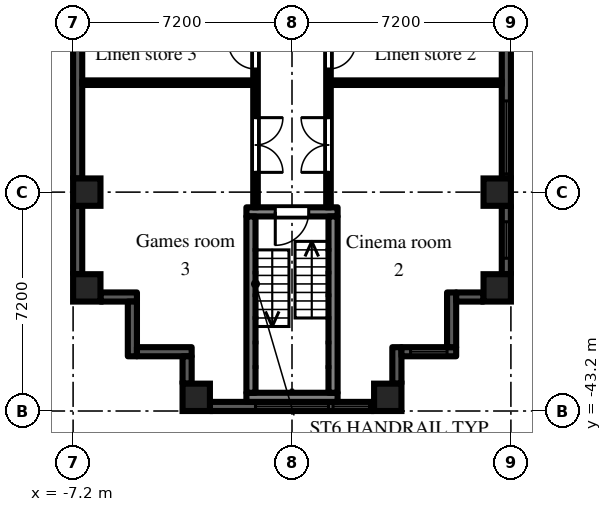
"""IFC4 building model, lengths in metres.
Left out: names, types, materials, properties, quantities, classifications, styles, units other than length and angle.
Written with IfcOpenShell. Run it as: python <this file> out.ifc"""

import sys

from ifc_helpers import new_model, si_unit, direction, frame, frame_2d, origin, origin_2d, place, context, subcontext, project, spatial, rectangle, extrude, element, fill, save


model = new_model("IFC4")
c1 = context("Model", 3, precision=1e-05, world=origin(), true_north=direction((0.0, 1.0)))
c2 = subcontext(c1, "Body", "Model", "MODEL_VIEW")
j1 = project(units=[si_unit("LENGTHUNIT", "METRE"), si_unit("PLANEANGLEUNIT", "RADIAN")], contexts=[c1])
p1 = place(None, origin())
s1 = spatial("IfcSite", under=j1, at=p1, CompositionType="ELEMENT")
p2 = place(p1, origin())
s2 = spatial("IfcBuilding", under=s1, at=p2, CompositionType="ELEMENT")
p3 = place(p2, frame((0.0, 0.0, 35.7)))
s3 = spatial("IfcBuildingStorey", under=s2, at=p3, CompositionType="ELEMENT", Elevation=35.7)
for number, where, z_axis, x_axis in (
    (1, (-6.75, -39.15, 0.0), (0.0, 0.0, 1.0), (1.0, 0.0, 0.0)),
    (2, (-6.75, -36.0, 0.0), (0.0, 0.0, 1.0), (1.0, 0.0, 0.0)),
    (3, (-3.15, -42.75, 0.0), (0.0, 0.0, 1.0), (1.0, 0.0, 0.0)),
    (4, (3.15, -42.75, 0.0), (0.0, 0.0, 1.0), (1.0, 0.0, 0.0)),
    (5, (6.75, -39.15, 0.0), (0.0, 0.0, 1.0), (1.0, 0.0, 0.0)),
    (6, (6.75, -36.0, 0.0), (0.0, 0.0, 1.0), (1.0, 0.0, 0.0)),
):
    element("IfcColumn", number, at=place(p3, frame(where, z_axis=z_axis, x_axis=x_axis)), inside=s3, PredefinedType="COLUMN", context=c2, shape_type="SweptSolid", body=[
        extrude(rectangle(XDim=0.9, YDim=0.9, at=origin_2d()), origin(), (0.0, 0.0, 1.0), 3.0),
    ])
p4 = place(p3, frame((-7.05, -29.25, 0.0), z_axis=(0.0, 0.0, 1.0), x_axis=(0.0, -1.0, 0.0)))
e7 = element("IfcWall", 7, at=p4, inside=s3, PredefinedType="SOLIDWALL", context=c2, shape_type="SweptSolid", body=[
    extrude(rectangle(XDim=6.3, YDim=0.3, at=frame_2d((3.15, 0.0))), origin(), (0.0, 0.0, 1.0), 2.1),
])
p5 = place(p3, frame((-7.05, -36.45, 0.0), z_axis=(0.0, 0.0, 1.0), x_axis=(0.0, -1.0, 0.0)))
e8 = element("IfcWall", 8, at=p5, inside=s3, PredefinedType="SOLIDWALL", context=c2, shape_type="SweptSolid", body=[
    extrude(rectangle(XDim=2.25, YDim=0.3, at=frame_2d((1.125, 0.0))), origin(), (0.0, 0.0, 1.0), 2.1),
])
p6 = place(p3, frame((-6.3, -39.45, 0.0), z_axis=(0.0, 0.0, 1.0), x_axis=(1.0, 0.0, 0.0)))
e9 = element("IfcWall", 9, at=p6, inside=s3, PredefinedType="SOLIDWALL", context=c2, shape_type="SweptSolid", body=[
    extrude(rectangle(XDim=1.2, YDim=0.3, at=frame_2d((0.6, 0.0))), origin(), (0.0, 0.0, 1.0), 2.575),
])
p7 = place(p3, frame((-5.25, -39.6, 0.0), z_axis=(0.0, 0.0, 1.0), x_axis=(0.0, -1.0, 0.0)))
e10 = element("IfcWall", 10, at=p7, inside=s3, PredefinedType="SOLIDWALL", context=c2, shape_type="SweptSolid", body=[
    extrude(rectangle(XDim=1.8, YDim=0.3, at=frame_2d((0.9, 0.0))), origin(), (0.0, 0.0, 1.0), 2.575),
])
p8 = place(p3, frame((-5.1, -41.25, 0.0), z_axis=(0.0, 0.0, 1.0), x_axis=(1.0, 0.0, 0.0)))
e11 = element("IfcWall", 11, at=p8, inside=s3, PredefinedType="SOLIDWALL", context=c2, shape_type="SweptSolid", body=[
    extrude(rectangle(XDim=1.8, YDim=0.3, at=frame_2d((0.9, 0.0))), origin(), (0.0, 0.0, 1.0), 2.575),
])
p9 = place(p3, frame((-3.45, -41.4, 0.0), z_axis=(0.0, 0.0, 1.0), x_axis=(0.0, -1.0, 0.0)))
e12 = element("IfcWall", 12, at=p9, inside=s3, PredefinedType="SOLIDWALL", context=c2, shape_type="SweptSolid", body=[
    extrude(rectangle(XDim=0.9, YDim=0.3, at=frame_2d((0.45, 0.0))), origin(), (0.0, 0.0, 1.0), 2.575),
])
p10 = place(p3, frame((-2.7, -43.05, 0.0), z_axis=(0.0, 0.0, 1.0), x_axis=(1.0, 0.0, 0.0)))
e13 = element("IfcWall", 13, at=p10, inside=s3, PredefinedType="SOLIDWALL", context=c2, shape_type="SweptSolid", body=[
    extrude(rectangle(XDim=5.4, YDim=0.3, at=frame_2d((2.7, 0.0))), origin(), (0.0, 0.0, 1.0), 2.1),
])
p11 = place(p10, frame((1.5, 0.0, 0.2)))
e14 = element("IfcOpeningElement", 14, at=p11, cuts=e13, PredefinedType="OPENING", context=c2, shape_type="SweptSolid", body=[
    extrude(rectangle(XDim=2.4, YDim=1.85, at=frame_2d((1.2, 0.925))), frame((0.0, 0.16, 0.0), z_axis=(0.0, -1.0, 0.0), x_axis=(1.0, 0.0, 0.0)), (0.0, 0.0, 1.0), 0.32),
])
p12 = place(p10, frame((4.05, 0.0, 0.2)))
e15 = element("IfcOpeningElement", 15, at=p12, cuts=e13, PredefinedType="OPENING", context=c2, shape_type="SweptSolid", body=[
    extrude(rectangle(XDim=1.2, YDim=1.85, at=frame_2d((0.6, 0.925))), frame((0.0, 0.16, 0.0), z_axis=(0.0, -1.0, 0.0), x_axis=(1.0, 0.0, 0.0)), (0.0, 0.0, 1.0), 0.32),
])
p13 = place(p3, frame((3.45, -42.3, 0.0), z_axis=(0.0, 0.0, 1.0), x_axis=(0.0, 1.0, 0.0)))
e16 = element("IfcWall", 16, at=p13, inside=s3, PredefinedType="SOLIDWALL", context=c2, shape_type="SweptSolid", body=[
    extrude(rectangle(XDim=1.2, YDim=0.3, at=frame_2d((0.6, 0.0))), origin(), (0.0, 0.0, 1.0), 2.575),
])
p14 = place(p3, frame((3.6, -41.25, 0.0), z_axis=(0.0, 0.0, 1.0), x_axis=(1.0, 0.0, 0.0)))
e17 = element("IfcWall", 17, at=p14, inside=s3, PredefinedType="SOLIDWALL", context=c2, shape_type="SweptSolid", body=[
    extrude(rectangle(XDim=1.8, YDim=0.3, at=frame_2d((0.9, 0.0))), origin(), (0.0, 0.0, 1.0), 2.575),
])
p15 = place(p14, frame((0.3, 0.0, 0.2)))
e18 = element("IfcOpeningElement", 18, at=p15, cuts=e17, PredefinedType="OPENING", context=c2, shape_type="SweptSolid", body=[
    extrude(rectangle(XDim=1.2, YDim=1.85, at=frame_2d((0.6, 0.925))), frame((0.0, 0.16, 0.0), z_axis=(0.0, -1.0, 0.0), x_axis=(1.0, 0.0, 0.0)), (0.0, 0.0, 1.0), 0.32),
])
p16 = place(p3, frame((5.25, -41.1, 0.0), z_axis=(0.0, 0.0, 1.0), x_axis=(0.0, 1.0, 0.0)))
e19 = element("IfcWall", 19, at=p16, inside=s3, PredefinedType="SOLIDWALL", context=c2, shape_type="SweptSolid", body=[
    extrude(rectangle(XDim=1.8, YDim=0.3, at=frame_2d((0.9, 0.0))), origin(), (0.0, 0.0, 1.0), 2.575),
])
p17 = place(p3, frame((5.4, -39.45, 0.0), z_axis=(0.0, 0.0, 1.0), x_axis=(1.0, 0.0, 0.0)))
e20 = element("IfcWall", 20, at=p17, inside=s3, PredefinedType="SOLIDWALL", context=c2, shape_type="SweptSolid", body=[
    extrude(rectangle(XDim=0.9, YDim=0.3, at=frame_2d((0.45, 0.0))), origin(), (0.0, 0.0, 1.0), 2.575),
])
p18 = place(p3, frame((7.05, -38.7, 0.0), z_axis=(0.0, 0.0, 1.0), x_axis=(0.0, 1.0, 0.0)))
e21 = element("IfcWall", 21, at=p18, inside=s3, PredefinedType="SOLIDWALL", context=c2, shape_type="SweptSolid", body=[
    extrude(rectangle(XDim=2.25, YDim=0.3, at=frame_2d((1.125, 0.0))), origin(), (0.0, 0.0, 1.0), 2.1),
])
p19 = place(p18, frame((0.525, 0.0, 0.2)))
e22 = element("IfcOpeningElement", 22, at=p19, cuts=e21, PredefinedType="OPENING", context=c2, shape_type="SweptSolid", body=[
    extrude(rectangle(XDim=1.2, YDim=1.85, at=frame_2d((0.6, 0.925))), frame((0.0, 0.16, 0.0), z_axis=(0.0, -1.0, 0.0), x_axis=(1.0, 0.0, 0.0)), (0.0, 0.0, 1.0), 0.32),
])
p20 = place(p3, frame((7.05, -35.55, 0.0), z_axis=(0.0, 0.0, 1.0), x_axis=(0.0, 1.0, 0.0)))
e23 = element("IfcWall", 23, at=p20, inside=s3, PredefinedType="SOLIDWALL", context=c2, shape_type="SweptSolid", body=[
    extrude(rectangle(XDim=6.3, YDim=0.3, at=frame_2d((3.15, 0.0))), origin(), (0.0, 0.0, 1.0), 2.1),
])
p21 = place(p20, frame((0.15, 0.0, 0.2)))
e24 = element("IfcOpeningElement", 24, at=p21, cuts=e23, PredefinedType="OPENING", context=c2, shape_type="SweptSolid", body=[
    extrude(rectangle(XDim=2.4, YDim=1.85, at=frame_2d((1.2, 0.925))), frame((0.0, 0.16, 0.0), z_axis=(0.0, -1.0, 0.0), x_axis=(1.0, 0.0, 0.0)), (0.0, 0.0, 1.0), 0.32),
])
p22 = place(p3, frame((-1.5, -36.65, 0.0), z_axis=(0.0, 0.0, 1.0), x_axis=(1.0, 0.0, 0.0)))
e25 = element("IfcWall", 25, at=p22, inside=s3, PredefinedType="SHEAR", context=c2, shape_type="SweptSolid", body=[
    extrude(rectangle(XDim=3.0, YDim=0.3, at=frame_2d((1.5, 0.0))), origin(), (0.0, 0.0, 1.0), 2.575),
])
p23 = place(p22, frame((0.95, 0.0, 0.0)))
e26 = element("IfcOpeningElement", 26, at=p23, cuts=e25, PredefinedType="OPENING", context=c2, shape_type="SweptSolid", body=[
    extrude(rectangle(XDim=1.1, YDim=2.1, at=frame_2d((0.55, 1.05))), frame((0.0, 0.16, 0.0), z_axis=(0.0, -1.0, 0.0), x_axis=(1.0, 0.0, 0.0)), (0.0, 0.0, 1.0), 0.32),
])
p24 = place(p3, frame((-1.5, -42.75, 0.0), z_axis=(0.0, 0.0, 1.0), x_axis=(1.0, 0.0, 0.0)))
e27 = element("IfcWall", 27, at=p24, inside=s3, PredefinedType="SHEAR", context=c2, shape_type="SweptSolid", body=[
    extrude(rectangle(XDim=3.0, YDim=0.3, at=frame_2d((1.5, 0.0))), origin(), (0.0, 0.0, 1.0), 2.575),
])
for number, where, z_axis, x_axis in (
    (28, (-1.35, -36.8, 0.0), (0.0, 0.0, 1.0), (0.0, -1.0, 0.0)),
    (29, (1.35, -36.8, 0.0), (0.0, 0.0, 1.0), (0.0, -1.0, 0.0)),
):
    element("IfcWall", number, at=place(p3, frame(where, z_axis=z_axis, x_axis=x_axis)), inside=s3, PredefinedType="SHEAR", context=c2, shape_type="SweptSolid", body=[
        extrude(rectangle(XDim=5.8, YDim=0.3, at=frame_2d((2.9, 0.0))), origin(), (0.0, 0.0, 1.0), 2.575),
    ])
p25 = place(p3, frame((-6.9, -32.4, 0.0), z_axis=(0.0, 0.0, 1.0), x_axis=(1.0, 0.0, 0.0)))
e30 = element("IfcWall", 30, at=p25, inside=s3, PredefinedType="PARTITIONING", context=c2, shape_type="SweptSolid", body=[
    extrude(rectangle(XDim=5.625, YDim=0.15, at=frame_2d((2.812, 0.0))), origin(), (0.0, 0.0, 1.0), 2.575),
])
p26 = place(p3, frame((-1.2, -36.5, 0.0), z_axis=(0.0, 0.0, 1.0), x_axis=(0.0, 1.0, 0.0)))
e31 = element("IfcWall", 31, at=p26, inside=s3, PredefinedType="PARTITIONING", context=c2, shape_type="SweptSolid", body=[
    extrude(rectangle(XDim=35.225, YDim=0.15, at=frame_2d((17.613, 0.0))), origin(), (0.0, 0.0, 1.0), 2.575),
])
p27 = place(p26, frame((33.65, 0.0, 0.0)))
e32 = element("IfcOpeningElement", 32, at=p27, cuts=e31, PredefinedType="OPENING", context=c2, shape_type="SweptSolid", body=[
    extrude(rectangle(XDim=0.9, YDim=2.1, at=frame_2d((0.45, 1.05))), frame((0.0, 0.085, 0.0), z_axis=(0.0, -1.0, 0.0), x_axis=(1.0, 0.0, 0.0)), (0.0, 0.0, 1.0), 0.17),
])
p28 = place(p26, frame((30.65, 0.0, 0.0)))
e33 = element("IfcOpeningElement", 33, at=p28, cuts=e31, PredefinedType="OPENING", context=c2, shape_type="SweptSolid", body=[
    extrude(rectangle(XDim=0.9, YDim=2.1, at=frame_2d((0.45, 1.05))), frame((0.0, 0.085, 0.0), z_axis=(0.0, -1.0, 0.0), x_axis=(1.0, 0.0, 0.0)), (0.0, 0.0, 1.0), 0.17),
])
p29 = place(p26, frame((23.05, 0.0, 0.0)))
e34 = element("IfcOpeningElement", 34, at=p29, cuts=e31, PredefinedType="OPENING", context=c2, shape_type="SweptSolid", body=[
    extrude(rectangle(XDim=0.9, YDim=2.1, at=frame_2d((0.45, 1.05))), frame((0.0, 0.085, 0.0), z_axis=(0.0, -1.0, 0.0), x_axis=(1.0, 0.0, 0.0)), (0.0, 0.0, 1.0), 0.17),
])
p30 = place(p26, frame((26.65, 0.0, 0.0)))
e35 = element("IfcOpeningElement", 35, at=p30, cuts=e31, PredefinedType="OPENING", context=c2, shape_type="SweptSolid", body=[
    extrude(rectangle(XDim=0.9, YDim=2.1, at=frame_2d((0.45, 1.05))), frame((0.0, 0.085, 0.0), z_axis=(0.0, -1.0, 0.0), x_axis=(1.0, 0.0, 0.0)), (0.0, 0.0, 1.0), 0.17),
])
p31 = place(p26, frame((17.3, 0.0, 0.0)))
e36 = element("IfcOpeningElement", 36, at=p31, cuts=e31, PredefinedType="OPENING", context=c2, shape_type="SweptSolid", body=[
    extrude(rectangle(XDim=1.0, YDim=2.1, at=frame_2d((0.5, 1.05))), frame((0.0, 0.085, 0.0), z_axis=(0.0, -1.0, 0.0), x_axis=(1.0, 0.0, 0.0)), (0.0, 0.0, 1.0), 0.17),
])
p32 = place(p26, frame((12.65, 0.0, 0.0)))
e37 = element("IfcOpeningElement", 37, at=p32, cuts=e31, PredefinedType="OPENING", context=c2, shape_type="SweptSolid", body=[
    extrude(rectangle(XDim=0.9, YDim=2.1, at=frame_2d((0.45, 1.05))), frame((0.0, 0.085, 0.0), z_axis=(0.0, -1.0, 0.0), x_axis=(1.0, 0.0, 0.0)), (0.0, 0.0, 1.0), 0.17),
])
p33 = place(p26, frame((10.1, 0.0, 0.0)))
e38 = element("IfcOpeningElement", 38, at=p33, cuts=e31, PredefinedType="OPENING", context=c2, shape_type="SweptSolid", body=[
    extrude(rectangle(XDim=1.0, YDim=2.1, at=frame_2d((0.5, 1.05))), frame((0.0, 0.085, 0.0), z_axis=(0.0, -1.0, 0.0), x_axis=(1.0, 0.0, 0.0)), (0.0, 0.0, 1.0), 0.17),
])
p34 = place(p26, frame((6.35, 0.0, 0.0)))
e39 = element("IfcOpeningElement", 39, at=p34, cuts=e31, PredefinedType="OPENING", context=c2, shape_type="SweptSolid", body=[
    extrude(rectangle(XDim=0.9, YDim=2.1, at=frame_2d((0.45, 1.05))), frame((0.0, 0.085, 0.0), z_axis=(0.0, -1.0, 0.0), x_axis=(1.0, 0.0, 0.0)), (0.0, 0.0, 1.0), 0.17),
])
p35 = place(p26, frame((4.55, 0.0, 0.0)))
e40 = element("IfcOpeningElement", 40, at=p35, cuts=e31, PredefinedType="OPENING", context=c2, shape_type="SweptSolid", body=[
    extrude(rectangle(XDim=0.9, YDim=2.1, at=frame_2d((0.45, 1.05))), frame((0.0, 0.085, 0.0), z_axis=(0.0, -1.0, 0.0), x_axis=(1.0, 0.0, 0.0)), (0.0, 0.0, 1.0), 0.17),
])
p36 = place(p26, frame((1.15, 0.0, 0.0)))
e41 = element("IfcOpeningElement", 41, at=p36, cuts=e31, PredefinedType="OPENING", context=c2, shape_type="SweptSolid", body=[
    extrude(rectangle(XDim=1.8, YDim=2.1, at=frame_2d((0.9, 1.05))), frame((0.0, 0.085, 0.0), z_axis=(0.0, -1.0, 0.0), x_axis=(1.0, 0.0, 0.0)), (0.0, 0.0, 1.0), 0.17),
])
p37 = place(p3, frame((1.2, -36.5, 0.0), z_axis=(0.0, 0.0, 1.0), x_axis=(0.0, 1.0, 0.0)))
e42 = element("IfcWall", 42, at=p37, inside=s3, PredefinedType="PARTITIONING", context=c2, shape_type="SweptSolid", body=[
    extrude(rectangle(XDim=35.375, YDim=0.15, at=frame_2d((17.688, 0.0))), origin(), (0.0, 0.0, 1.0), 2.575),
])
p38 = place(p37, frame((31.85, 0.0, 0.0)))
e43 = element("IfcOpeningElement", 43, at=p38, cuts=e42, PredefinedType="OPENING", context=c2, shape_type="SweptSolid", body=[
    extrude(rectangle(XDim=0.9, YDim=2.1, at=frame_2d((0.45, 1.05))), frame((0.0, 0.085, 0.0), z_axis=(0.0, -1.0, 0.0), x_axis=(1.0, 0.0, 0.0)), (0.0, 0.0, 1.0), 0.17),
])
p39 = place(p37, frame((27.45, 0.0, 0.0)))
e44 = element("IfcOpeningElement", 44, at=p39, cuts=e42, PredefinedType="OPENING", context=c2, shape_type="SweptSolid", body=[
    extrude(rectangle(XDim=0.9, YDim=2.1, at=frame_2d((0.45, 1.05))), frame((0.0, 0.085, 0.0), z_axis=(0.0, -1.0, 0.0), x_axis=(1.0, 0.0, 0.0)), (0.0, 0.0, 1.0), 0.17),
])
p40 = place(p37, frame((23.85, 0.0, 0.0)))
e45 = element("IfcOpeningElement", 45, at=p40, cuts=e42, PredefinedType="OPENING", context=c2, shape_type="SweptSolid", body=[
    extrude(rectangle(XDim=0.9, YDim=2.1, at=frame_2d((0.45, 1.05))), frame((0.0, 0.085, 0.0), z_axis=(0.0, -1.0, 0.0), x_axis=(1.0, 0.0, 0.0)), (0.0, 0.0, 1.0), 0.17),
])
p41 = place(p37, frame((15.1, 0.0, 0.0)))
e46 = element("IfcOpeningElement", 46, at=p41, cuts=e42, PredefinedType="OPENING", context=c2, shape_type="SweptSolid", body=[
    extrude(rectangle(XDim=1.0, YDim=2.1, at=frame_2d((0.5, 1.05))), frame((0.0, 0.085, 0.0), z_axis=(0.0, -1.0, 0.0), x_axis=(1.0, 0.0, 0.0)), (0.0, 0.0, 1.0), 0.17),
])
p42 = place(p37, frame((8.01, 0.0, 0.0)))
e47 = element("IfcOpeningElement", 47, at=p42, cuts=e42, PredefinedType="OPENING", context=c2, shape_type="SweptSolid", body=[
    extrude(rectangle(XDim=1.0, YDim=2.1, at=frame_2d((0.5, 1.05))), frame((0.0, 0.085, 0.0), z_axis=(0.0, -1.0, 0.0), x_axis=(1.0, 0.0, 0.0)), (0.0, 0.0, 1.0), 0.17),
])
p43 = place(p37, frame((6.35, 0.0, 0.0)))
e48 = element("IfcOpeningElement", 48, at=p43, cuts=e42, PredefinedType="OPENING", context=c2, shape_type="SweptSolid", body=[
    extrude(rectangle(XDim=0.9, YDim=2.1, at=frame_2d((0.45, 1.05))), frame((0.0, 0.085, 0.0), z_axis=(0.0, -1.0, 0.0), x_axis=(1.0, 0.0, 0.0)), (0.0, 0.0, 1.0), 0.17),
])
p44 = place(p37, frame((4.55, 0.0, 0.0)))
e49 = element("IfcOpeningElement", 49, at=p44, cuts=e42, PredefinedType="OPENING", context=c2, shape_type="SweptSolid", body=[
    extrude(rectangle(XDim=0.9, YDim=2.1, at=frame_2d((0.45, 1.05))), frame((0.0, 0.085, 0.0), z_axis=(0.0, -1.0, 0.0), x_axis=(1.0, 0.0, 0.0)), (0.0, 0.0, 1.0), 0.17),
])
p45 = place(p37, frame((1.15, 0.0, 0.0)))
e50 = element("IfcOpeningElement", 50, at=p45, cuts=e42, PredefinedType="OPENING", context=c2, shape_type="SweptSolid", body=[
    extrude(rectangle(XDim=1.8, YDim=2.1, at=frame_2d((0.9, 1.05))), frame((0.0, 0.085, 0.0), z_axis=(0.0, -1.0, 0.0), x_axis=(1.0, 0.0, 0.0)), (0.0, 0.0, 1.0), 0.17),
])
p46 = place(p3, frame((1.275, -32.4, 0.0), z_axis=(0.0, 0.0, 1.0), x_axis=(1.0, 0.0, 0.0)))
e51 = element("IfcWall", 51, at=p46, inside=s3, PredefinedType="PARTITIONING", context=c2, shape_type="SweptSolid", body=[
    extrude(rectangle(XDim=5.625, YDim=0.15, at=frame_2d((2.812, 0.0))), origin(), (0.0, 0.0, 1.0), 2.575),
])
p47 = place(p11, origin())
e52 = element("IfcWindow", 52, at=p47, inside=s3, PartitioningType="SINGLE_PANEL", PredefinedType="WINDOW", context=c2, shape_type="SweptSolid", body=[
    extrude(rectangle(XDim=2.4, YDim=1.85, at=frame_2d((1.2, 0.925))), frame((0.0, 0.03, 0.0), z_axis=(0.0, -1.0, 0.0), x_axis=(1.0, 0.0, 0.0)), (0.0, 0.0, 1.0), 0.06),
])
fill(e14, e52)
p48 = place(p12, origin())
e53 = element("IfcWindow", 53, at=p48, inside=s3, PartitioningType="SINGLE_PANEL", PredefinedType="WINDOW", context=c2, shape_type="SweptSolid", body=[
    extrude(rectangle(XDim=1.2, YDim=1.85, at=frame_2d((0.6, 0.925))), frame((0.0, 0.03, 0.0), z_axis=(0.0, -1.0, 0.0), x_axis=(1.0, 0.0, 0.0)), (0.0, 0.0, 1.0), 0.06),
])
fill(e15, e53)
p49 = place(p15, origin())
e54 = element("IfcWindow", 54, at=p49, inside=s3, PartitioningType="SINGLE_PANEL", PredefinedType="WINDOW", context=c2, shape_type="SweptSolid", body=[
    extrude(rectangle(XDim=1.2, YDim=1.85, at=frame_2d((0.6, 0.925))), frame((0.0, 0.03, 0.0), z_axis=(0.0, -1.0, 0.0), x_axis=(1.0, 0.0, 0.0)), (0.0, 0.0, 1.0), 0.06),
])
fill(e18, e54)
p50 = place(p19, origin())
e55 = element("IfcWindow", 55, at=p50, inside=s3, PartitioningType="SINGLE_PANEL", PredefinedType="WINDOW", context=c2, shape_type="SweptSolid", body=[
    extrude(rectangle(XDim=1.2, YDim=1.85, at=frame_2d((0.6, 0.925))), frame((0.0, 0.03, 0.0), z_axis=(0.0, -1.0, 0.0), x_axis=(1.0, 0.0, 0.0)), (0.0, 0.0, 1.0), 0.06),
])
fill(e22, e55)
p51 = place(p21, origin())
e56 = element("IfcWindow", 56, at=p51, inside=s3, PartitioningType="SINGLE_PANEL", PredefinedType="WINDOW", context=c2, shape_type="SweptSolid", body=[
    extrude(rectangle(XDim=2.4, YDim=1.85, at=frame_2d((1.2, 0.925))), frame((0.0, 0.03, 0.0), z_axis=(0.0, -1.0, 0.0), x_axis=(1.0, 0.0, 0.0)), (0.0, 0.0, 1.0), 0.06),
])
fill(e24, e56)
p52 = place(p23, frame((1.1, 0.0, 0.0), z_axis=(0.0, 0.0, 1.0), x_axis=(-1.0, 0.0, 0.0)))
e57 = element("IfcDoor", 57, at=p52, inside=s3, OperationType="SINGLE_SWING_RIGHT", PredefinedType="DOOR", context=c2, shape_type="SweptSolid", body=[
    extrude(rectangle(XDim=1.1, YDim=2.1, at=frame_2d((0.55, 1.05))), frame((0.0, 0.025, 0.0), z_axis=(0.0, -1.0, 0.0), x_axis=(1.0, 0.0, 0.0)), (0.0, 0.0, 1.0), 0.05),
])
fill(e26, e57)
p53 = place(p44, frame((0.9, 0.0, 0.0), z_axis=(0.0, 0.0, 1.0), x_axis=(-1.0, 0.0, 0.0)))
e58 = element("IfcDoor", 58, at=p53, inside=s3, OperationType="SINGLE_SWING_LEFT", PredefinedType="DOOR", context=c2, shape_type="SweptSolid", body=[
    extrude(rectangle(XDim=0.9, YDim=2.1, at=frame_2d((0.45, 1.05))), frame((0.0, 0.025, 0.0), z_axis=(0.0, -1.0, 0.0), x_axis=(1.0, 0.0, 0.0)), (0.0, 0.0, 1.0), 0.05),
])
fill(e49, e58)
p54 = place(p45, origin())
e59 = element("IfcDoor", 59, at=p54, inside=s3, OperationType="DOUBLE_DOOR_DOUBLE_SWING", PredefinedType="DOOR", context=c2, shape_type="SweptSolid", body=[
    extrude(rectangle(XDim=1.8, YDim=2.1, at=frame_2d((0.9, 1.05))), frame((0.0, 0.025, 0.0), z_axis=(0.0, -1.0, 0.0), x_axis=(1.0, 0.0, 0.0)), (0.0, 0.0, 1.0), 0.05),
])
fill(e50, e59)
p55 = place(p35, origin())
e60 = element("IfcDoor", 60, at=p55, inside=s3, OperationType="SINGLE_SWING_RIGHT", PredefinedType="DOOR", context=c2, shape_type="SweptSolid", body=[
    extrude(rectangle(XDim=0.9, YDim=2.1, at=frame_2d((0.45, 1.05))), frame((0.0, 0.025, 0.0), z_axis=(0.0, -1.0, 0.0), x_axis=(1.0, 0.0, 0.0)), (0.0, 0.0, 1.0), 0.05),
])
fill(e40, e60)
p56 = place(p36, frame((1.8, 0.0, 0.0), z_axis=(0.0, 0.0, 1.0), x_axis=(-1.0, 0.0, 0.0)))
e61 = element("IfcDoor", 61, at=p56, inside=s3, OperationType="DOUBLE_DOOR_DOUBLE_SWING", PredefinedType="DOOR", context=c2, shape_type="SweptSolid", body=[
    extrude(rectangle(XDim=1.8, YDim=2.1, at=frame_2d((0.9, 1.05))), frame((0.0, 0.025, 0.0), z_axis=(0.0, -1.0, 0.0), x_axis=(1.0, 0.0, 0.0)), (0.0, 0.0, 1.0), 0.05),
])
fill(e41, e61)
save(model, sys.argv[1])
